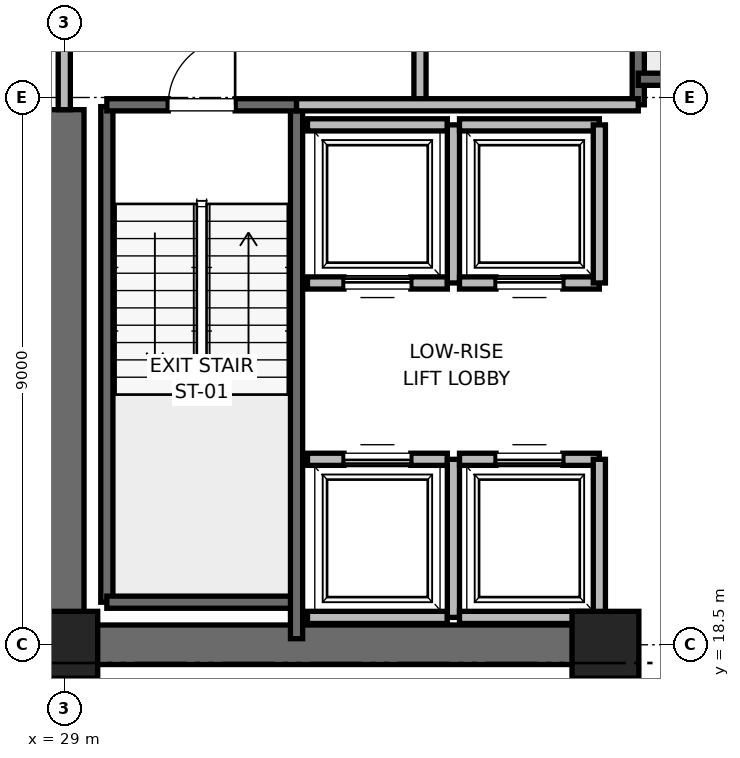
"""IFC4 building model, lengths in metres.
Left out: names, types, materials, properties, quantities, classifications, styles, units other than length and angle.
Written with IfcOpenShell. Run it as: python <this file> out.ifc"""

import sys

from ifc_helpers import new_model, si_unit, direction, frame, frame_2d, origin, origin_2d, place, context, subcontext, project, spatial, rectangle, extrude, element, fill, save


model = new_model("IFC4")
c1 = context("Model", 3, precision=1e-05, world=origin(), true_north=direction((0.0, 1.0)))
c2 = subcontext(c1, "Body", "Model", "MODEL_VIEW")
j1 = project(units=[si_unit("LENGTHUNIT", "METRE"), si_unit("PLANEANGLEUNIT", "RADIAN")], contexts=[c1])
p1 = place(None, origin())
s1 = spatial("IfcSite", under=j1, at=p1, CompositionType="ELEMENT")
p2 = place(p1, origin())
s2 = spatial("IfcBuilding", under=s1, at=p2, CompositionType="ELEMENT")
p3 = place(p2, frame((0.0, 0.0, 63.6)))
s3 = spatial("IfcBuildingStorey", under=s2, at=p3, CompositionType="ELEMENT", Elevation=63.6)
for number, where, z_axis, x_axis in (
    (1, (29.0, 18.5, 0.0), (0.0, 0.0, 1.0), (1.0, 0.0, 0.0)),
    (2, (37.9, 18.5, 0.0), (0.0, 0.0, 1.0), (1.0, 0.0, 0.0)),
):
    element("IfcColumn", number, at=place(p3, frame(where, z_axis=z_axis, x_axis=x_axis)), inside=s3, PredefinedType="PILASTER", context=c2, shape_type="SweptSolid", body=[
        extrude(rectangle(XDim=1.1, YDim=1.1, at=origin_2d()), origin(), (0.0, 0.0, 1.0), 4.0),
    ])
p4 = place(p3, frame((29.0, 18.5, 0.0), z_axis=(0.0, 0.0, 1.0), x_axis=(1.0, 0.0, 0.0)))
e3 = element("IfcWall", 3, at=p4, inside=s3, PredefinedType="SHEAR", context=c2, shape_type="SweptSolid", body=[
    extrude(rectangle(XDim=9.2, YDim=0.65, at=frame_2d((4.6, 0.0))), origin(), (0.0, 0.0, 1.0), 3.76),
])
p5 = place(p3, frame((29.0, 18.5, 0.0), z_axis=(0.0, 0.0, 1.0), x_axis=(0.0, 1.0, 0.0)))
e4 = element("IfcWall", 4, at=p5, inside=s3, PredefinedType="SHEAR", context=c2, shape_type="SweptSolid", body=[
    extrude(rectangle(XDim=8.8, YDim=0.65, at=frame_2d((4.4, 0.0))), origin(), (0.0, 0.0, 1.0), 3.76),
])
p6 = place(p3, frame((29.7, 19.2, 0.0), z_axis=(0.0, 0.0, 1.0), x_axis=(0.0, 1.0, 0.0)))
e5 = element("IfcWall", 5, at=p6, inside=s3, PredefinedType="SOLIDWALL", context=c2, shape_type="SweptSolid", body=[
    extrude(rectangle(XDim=8.15, YDim=0.2, at=frame_2d((4.075, 0.0))), origin(), (0.0, 0.0, 1.0), 3.76),
])
p7 = place(p3, frame((29.7, 19.2, 0.0), z_axis=(0.0, 0.0, 1.0), x_axis=(1.0, 0.0, 0.0)))
e6 = element("IfcWall", 6, at=p7, inside=s3, PredefinedType="SOLIDWALL", context=c2, shape_type="SweptSolid", body=[
    extrude(rectangle(XDim=3.12, YDim=0.2, at=frame_2d((1.56, 0.0))), origin(), (0.0, 0.0, 1.0), 3.76),
])
p8 = place(p3, frame((32.82, 18.6, 0.0), z_axis=(0.0, 0.0, 1.0), x_axis=(0.0, 1.0, 0.0)))
e7 = element("IfcWall", 7, at=p8, inside=s3, PredefinedType="SOLIDWALL", context=c2, shape_type="SweptSolid", body=[
    extrude(rectangle(XDim=8.78, YDim=0.2, at=frame_2d((4.39, 0.0))), origin(), (0.0, 0.0, 1.0), 3.76),
])
p9 = place(p3, frame((29.7, 27.38, 0.0), z_axis=(0.0, 0.0, 1.0), x_axis=(1.0, 0.0, 0.0)))
e8 = element("IfcWall", 8, at=p9, inside=s3, PredefinedType="SOLIDWALL", context=c2, shape_type="SweptSolid", body=[
    extrude(rectangle(XDim=3.12, YDim=0.2, at=frame_2d((1.56, 0.0))), origin(), (0.0, 0.0, 1.0), 3.76),
])
p10 = place(p9, frame((1.01, 0.0, 0.0)))
e9 = element("IfcOpeningElement", 9, at=p10, cuts=e8, PredefinedType="OPENING", context=c2, shape_type="SweptSolid", body=[
    extrude(rectangle(XDim=1.1, YDim=2.15, at=frame_2d((0.55, 1.075))), frame((0.0, 0.1, 0.0), z_axis=(0.0, -1.0, 0.0), x_axis=(1.0, 0.0, 0.0)), (0.0, 0.0, 1.0), 0.2),
])
p11 = place(p3, frame((38.44, 27.38, 0.0), z_axis=(0.0, 0.0, 1.0), x_axis=(0.0, 1.0, 0.0)))
e10 = element("IfcWall", 10, at=p11, inside=s3, PredefinedType="SOLIDWALL", context=c2, shape_type="SweptSolid", body=[
    extrude(rectangle(XDim=8.87, YDim=0.2, at=frame_2d((4.435, 0.0))), origin(), (0.0, 0.0, 1.0), 3.76),
])
p12 = place(p3, frame((38.44, 27.8, 0.0), z_axis=(0.0, 0.0, 1.0), x_axis=(1.0, 0.0, 0.0)))
e11 = element("IfcWall", 11, at=p12, inside=s3, PredefinedType="SOLIDWALL", context=c2, shape_type="SweptSolid", body=[
    extrude(rectangle(XDim=3.32, YDim=0.2, at=frame_2d((1.66, 0.0))), origin(), (0.0, 0.0, 1.0), 3.76),
])
p13 = place(p3, frame((34.85, 27.38, 0.0), z_axis=(0.0, 0.0, 1.0), x_axis=(0.0, 1.0, 0.0)))
e12 = element("IfcWall", 12, at=p13, inside=s3, PredefinedType="PARTITIONING", context=c2, shape_type="SweptSolid", body=[
    extrude(rectangle(XDim=3.37, YDim=0.2, at=frame_2d((1.685, 0.0))), origin(), (0.0, 0.0, 1.0), 3.76),
])
p14 = place(p13, frame((1.11, 0.0, 0.0)))
e13 = element("IfcOpeningElement", 13, at=p14, cuts=e12, PredefinedType="OPENING", context=c2, shape_type="SweptSolid", body=[
    extrude(rectangle(XDim=1.15, YDim=2.2, at=frame_2d((0.575, 1.1))), frame((0.0, 0.1, 0.0), z_axis=(0.0, -1.0, 0.0), x_axis=(1.0, 0.0, 0.0)), (0.0, 0.0, 1.0), 0.2),
])
p15 = place(p3, frame((29.0, 27.3, 0.0), z_axis=(0.0, 0.0, 1.0), x_axis=(0.0, 1.0, 0.0)))
e14 = element("IfcWall", 14, at=p15, inside=s3, PredefinedType="PARTITIONING", context=c2, shape_type="SweptSolid", body=[
    extrude(rectangle(XDim=3.4, YDim=0.2, at=frame_2d((1.7, 0.0))), origin(), (0.0, 0.0, 1.0), 2.54),
])
p16 = place(p15, frame((1.125, 0.0, 0.0)))
e15 = element("IfcOpeningElement", 15, at=p16, cuts=e14, PredefinedType="OPENING", context=c2, shape_type="SweptSolid", body=[
    extrude(rectangle(XDim=1.15, YDim=2.2, at=frame_2d((0.575, 1.1))), frame((0.0, 0.1, 0.0), z_axis=(0.0, -1.0, 0.0), x_axis=(1.0, 0.0, 0.0)), (0.0, 0.0, 1.0), 0.2),
])
p17 = place(p3, frame((32.82, 27.38, 0.0), z_axis=(0.0, 0.0, 1.0), x_axis=(1.0, 0.0, 0.0)))
e16 = element("IfcWall", 16, at=p17, inside=s3, PredefinedType="PARTITIONING", context=c2, shape_type="SweptSolid", body=[
    extrude(rectangle(XDim=5.62, YDim=0.2, at=frame_2d((2.81, 0.0))), origin(), (0.0, 0.0, 1.0), 3.76),
])
p18 = place(p3, frame((33.0, 18.95, 0.0), z_axis=(0.0, 0.0, 1.0), x_axis=(1.0, 0.0, 0.0)))
e17 = element("IfcWall", 17, at=p18, inside=s3, PredefinedType="SOLIDWALL", context=c2, shape_type="SweptSolid", body=[
    extrude(rectangle(XDim=2.3, YDim=0.2, at=frame_2d((1.15, 0.0))), origin(), (0.0, 0.0, 1.0), 3.76),
])
p19 = place(p3, frame((35.3, 21.55, 0.0), z_axis=(0.0, 0.0, 1.0), x_axis=(-1.0, 0.0, 0.0)))
e18 = element("IfcWall", 18, at=p19, inside=s3, PredefinedType="SOLIDWALL", context=c2, shape_type="SweptSolid", body=[
    extrude(rectangle(XDim=2.3, YDim=0.2, at=frame_2d((1.15, 0.0))), origin(), (0.0, 0.0, 1.0), 3.76),
])
p20 = place(p19, frame((0.6, 0.0, 0.0)))
e19 = element("IfcOpeningElement", 19, at=p20, cuts=e18, PredefinedType="OPENING", context=c2, shape_type="SweptSolid", body=[
    extrude(rectangle(XDim=1.1, YDim=2.2, at=frame_2d((0.55, 1.1))), frame((0.0, 0.1, 0.0), z_axis=(0.0, -1.0, 0.0), x_axis=(1.0, 0.0, 0.0)), (0.0, 0.0, 1.0), 0.2),
])
p21 = place(p3, frame((35.4, 18.95, 0.0), z_axis=(0.0, 0.0, 1.0), x_axis=(0.0, 1.0, 0.0)))
e20 = element("IfcWall", 20, at=p21, inside=s3, PredefinedType="SOLIDWALL", context=c2, shape_type="SweptSolid", body=[
    extrude(rectangle(XDim=2.6, YDim=0.2, at=frame_2d((1.3, 0.0))), origin(), (0.0, 0.0, 1.0), 3.76),
])
p22 = place(p3, frame((35.5, 18.95, 0.0), z_axis=(0.0, 0.0, 1.0), x_axis=(1.0, 0.0, 0.0)))
e21 = element("IfcWall", 21, at=p22, inside=s3, PredefinedType="SOLIDWALL", context=c2, shape_type="SweptSolid", body=[
    extrude(rectangle(XDim=2.3, YDim=0.2, at=frame_2d((1.15, 0.0))), origin(), (0.0, 0.0, 1.0), 2.54),
])
p23 = place(p3, frame((37.8, 21.55, 0.0), z_axis=(0.0, 0.0, 1.0), x_axis=(-1.0, 0.0, 0.0)))
e22 = element("IfcWall", 22, at=p23, inside=s3, PredefinedType="SOLIDWALL", context=c2, shape_type="SweptSolid", body=[
    extrude(rectangle(XDim=2.3, YDim=0.2, at=frame_2d((1.15, 0.0))), origin(), (0.0, 0.0, 1.0), 3.76),
])
p24 = place(p23, frame((0.6, 0.0, 0.0)))
e23 = element("IfcOpeningElement", 23, at=p24, cuts=e22, PredefinedType="OPENING", context=c2, shape_type="SweptSolid", body=[
    extrude(rectangle(XDim=1.1, YDim=2.2, at=frame_2d((0.55, 1.1))), frame((0.0, 0.1, 0.0), z_axis=(0.0, -1.0, 0.0), x_axis=(1.0, 0.0, 0.0)), (0.0, 0.0, 1.0), 0.2),
])
p25 = place(p3, frame((37.8, 18.95, 0.0), z_axis=(0.0, 0.0, 1.0), x_axis=(0.0, 1.0, 0.0)))
e24 = element("IfcWall", 24, at=p25, inside=s3, PredefinedType="SOLIDWALL", context=c2, shape_type="SweptSolid", body=[
    extrude(rectangle(XDim=2.6, YDim=0.2, at=frame_2d((1.3, 0.0))), origin(), (0.0, 0.0, 1.0), 2.54),
])
p26 = place(p3, frame((33.0, 24.45, 0.0), z_axis=(0.0, 0.0, 1.0), x_axis=(1.0, 0.0, 0.0)))
e25 = element("IfcWall", 25, at=p26, inside=s3, PredefinedType="SOLIDWALL", context=c2, shape_type="SweptSolid", body=[
    extrude(rectangle(XDim=2.3, YDim=0.2, at=frame_2d((1.15, 0.0))), origin(), (0.0, 0.0, 1.0), 3.76),
])
p27 = place(p26, frame((0.6, 0.0, 0.0)))
e26 = element("IfcOpeningElement", 26, at=p27, cuts=e25, PredefinedType="OPENING", context=c2, shape_type="SweptSolid", body=[
    extrude(rectangle(XDim=1.1, YDim=2.2, at=frame_2d((0.55, 1.1))), frame((0.0, 0.1, 0.0), z_axis=(0.0, -1.0, 0.0), x_axis=(1.0, 0.0, 0.0)), (0.0, 0.0, 1.0), 0.2),
])
p28 = place(p3, frame((35.3, 27.05, 0.0), z_axis=(0.0, 0.0, 1.0), x_axis=(-1.0, 0.0, 0.0)))
e27 = element("IfcWall", 27, at=p28, inside=s3, PredefinedType="SOLIDWALL", context=c2, shape_type="SweptSolid", body=[
    extrude(rectangle(XDim=2.3, YDim=0.2, at=frame_2d((1.15, 0.0))), origin(), (0.0, 0.0, 1.0), 3.76),
])
p29 = place(p3, frame((35.4, 24.45, 0.0), z_axis=(0.0, 0.0, 1.0), x_axis=(0.0, 1.0, 0.0)))
e28 = element("IfcWall", 28, at=p29, inside=s3, PredefinedType="SOLIDWALL", context=c2, shape_type="SweptSolid", body=[
    extrude(rectangle(XDim=2.6, YDim=0.2, at=frame_2d((1.3, 0.0))), origin(), (0.0, 0.0, 1.0), 3.76),
])
p30 = place(p3, frame((35.5, 24.45, 0.0), z_axis=(0.0, 0.0, 1.0), x_axis=(1.0, 0.0, 0.0)))
e29 = element("IfcWall", 29, at=p30, inside=s3, PredefinedType="SOLIDWALL", context=c2, shape_type="SweptSolid", body=[
    extrude(rectangle(XDim=2.3, YDim=0.2, at=frame_2d((1.15, 0.0))), origin(), (0.0, 0.0, 1.0), 3.76),
])
p31 = place(p30, frame((0.6, 0.0, 0.0)))
e30 = element("IfcOpeningElement", 30, at=p31, cuts=e29, PredefinedType="OPENING", context=c2, shape_type="SweptSolid", body=[
    extrude(rectangle(XDim=1.1, YDim=2.2, at=frame_2d((0.55, 1.1))), frame((0.0, 0.1, 0.0), z_axis=(0.0, -1.0, 0.0), x_axis=(1.0, 0.0, 0.0)), (0.0, 0.0, 1.0), 0.2),
])
p32 = place(p3, frame((37.8, 27.05, 0.0), z_axis=(0.0, 0.0, 1.0), x_axis=(-1.0, 0.0, 0.0)))
e31 = element("IfcWall", 31, at=p32, inside=s3, PredefinedType="SOLIDWALL", context=c2, shape_type="SweptSolid", body=[
    extrude(rectangle(XDim=2.3, YDim=0.2, at=frame_2d((1.15, 0.0))), origin(), (0.0, 0.0, 1.0), 3.76),
])
p33 = place(p3, frame((37.8, 24.45, 0.0), z_axis=(0.0, 0.0, 1.0), x_axis=(0.0, 1.0, 0.0)))
e32 = element("IfcWall", 32, at=p33, inside=s3, PredefinedType="SOLIDWALL", context=c2, shape_type="SweptSolid", body=[
    extrude(rectangle(XDim=2.6, YDim=0.2, at=frame_2d((1.3, 0.0))), origin(), (0.0, 0.0, 1.0), 3.76),
])
p34 = place(p10, origin())
e33 = element("IfcDoor", 33, at=p34, inside=s3, OperationType="SINGLE_SWING_RIGHT", PredefinedType="DOOR", context=c2, shape_type="SweptSolid", body=[
    extrude(rectangle(XDim=1.1, YDim=2.15, at=frame_2d((0.55, 1.075))), frame((0.0, 0.025, 0.0), z_axis=(0.0, -1.0, 0.0), x_axis=(1.0, 0.0, 0.0)), (0.0, 0.0, 1.0), 0.05),
])
fill(e9, e33)
p35 = place(p20, origin())
e34 = element("IfcDoor", 34, at=p35, inside=s3, OperationType="SLIDING_TO_RIGHT", PredefinedType="DOOR", context=c2, shape_type="SweptSolid", body=[
    extrude(rectangle(XDim=1.1, YDim=2.2, at=frame_2d((0.55, 1.1))), frame((0.0, 0.025, 0.0), z_axis=(0.0, -1.0, 0.0), x_axis=(1.0, 0.0, 0.0)), (0.0, 0.0, 1.0), 0.05),
])
fill(e19, e34)
p36 = place(p24, origin())
e35 = element("IfcDoor", 35, at=p36, inside=s3, OperationType="SLIDING_TO_RIGHT", PredefinedType="DOOR", context=c2, shape_type="SweptSolid", body=[
    extrude(rectangle(XDim=1.1, YDim=2.2, at=frame_2d((0.55, 1.1))), frame((0.0, 0.025, 0.0), z_axis=(0.0, -1.0, 0.0), x_axis=(1.0, 0.0, 0.0)), (0.0, 0.0, 1.0), 0.05),
])
fill(e23, e35)
p37 = place(p27, origin())
e36 = element("IfcDoor", 36, at=p37, inside=s3, OperationType="SLIDING_TO_RIGHT", PredefinedType="DOOR", context=c2, shape_type="SweptSolid", body=[
    extrude(rectangle(XDim=1.1, YDim=2.2, at=frame_2d((0.55, 1.1))), frame((0.0, 0.025, 0.0), z_axis=(0.0, -1.0, 0.0), x_axis=(1.0, 0.0, 0.0)), (0.0, 0.0, 1.0), 0.05),
])
fill(e26, e36)
p38 = place(p31, origin())
e37 = element("IfcDoor", 37, at=p38, inside=s3, OperationType="SLIDING_TO_RIGHT", PredefinedType="DOOR", context=c2, shape_type="SweptSolid", body=[
    extrude(rectangle(XDim=1.1, YDim=2.2, at=frame_2d((0.55, 1.1))), frame((0.0, 0.025, 0.0), z_axis=(0.0, -1.0, 0.0), x_axis=(1.0, 0.0, 0.0)), (0.0, 0.0, 1.0), 0.05),
])
fill(e30, e37)
save(model, sys.argv[1])
